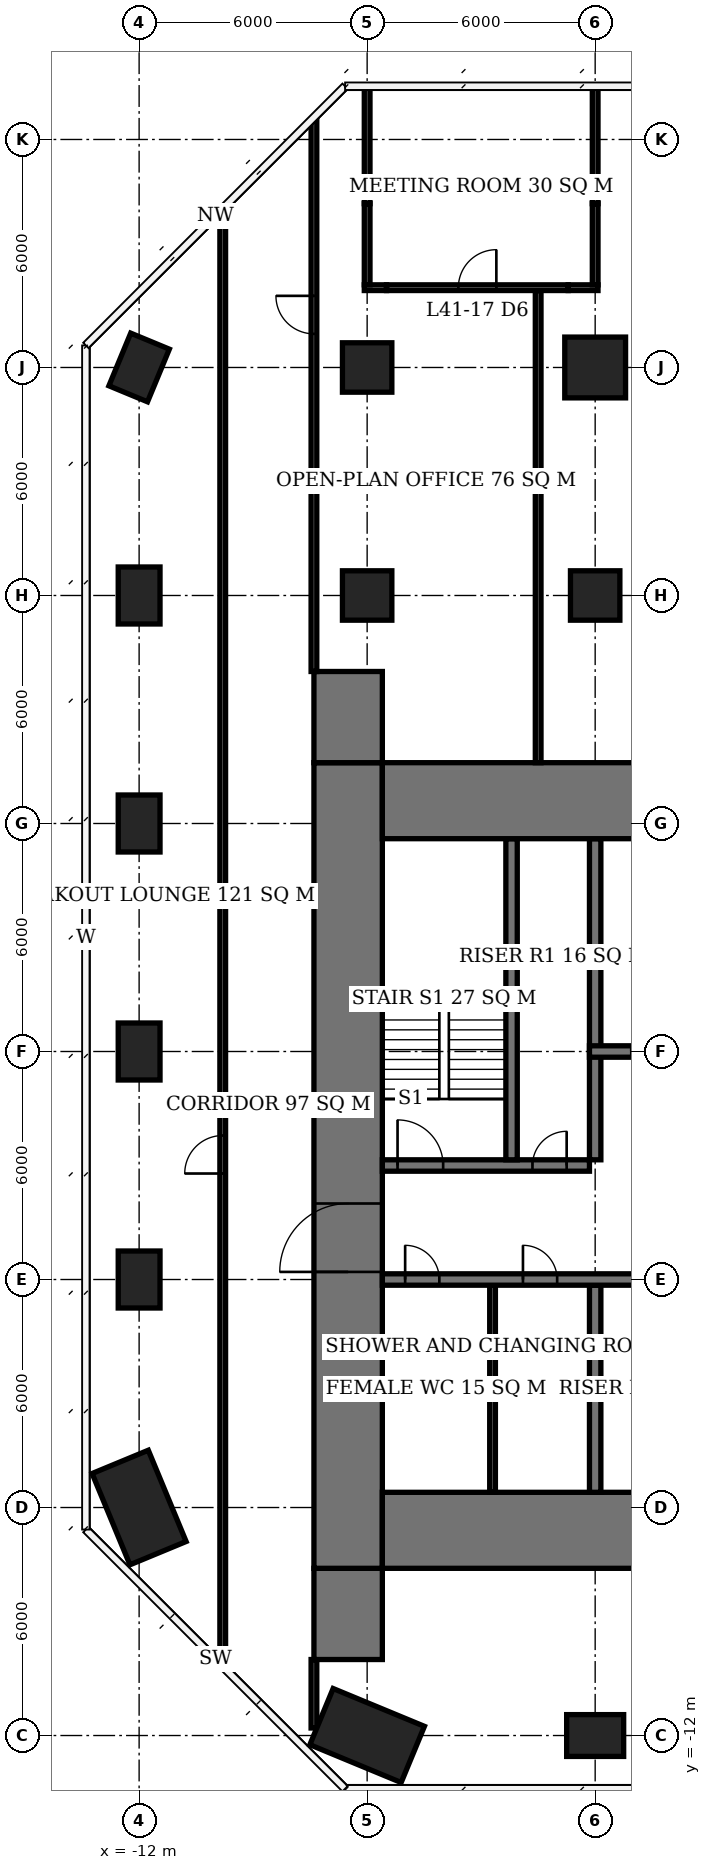
"""IFC4 building model, lengths in metres.
Left out: names, types, materials, properties, quantities, classifications, styles, units other than length and angle.
Written with IfcOpenShell. Run it as: python <this file> out.ifc"""

import sys

from ifc_helpers import new_model, si_unit, direction, frame, frame_2d, origin, origin_2d, place, context, subcontext, project, spatial, rectangle, extrude, element, fill, save


model = new_model("IFC4")
c1 = context("Model", 3, precision=1e-05, world=origin(), true_north=direction((0.0, 1.0)))
c2 = subcontext(c1, "Body", "Model", "MODEL_VIEW")
j1 = project(units=[si_unit("LENGTHUNIT", "METRE"), si_unit("PLANEANGLEUNIT", "RADIAN")], contexts=[c1])
p1 = place(None, origin())
s1 = spatial("IfcSite", under=j1, at=p1, CompositionType="ELEMENT")
p2 = place(p1, origin())
s2 = spatial("IfcBuilding", under=s1, at=p2, CompositionType="ELEMENT")
p3 = place(p2, frame((0.0, 0.0, 169.4)))
s3 = spatial("IfcBuildingStorey", under=s2, at=p3, CompositionType="ELEMENT", Elevation=169.4)
p4 = place(p3, frame((-12.0, -6.0, 0.0), z_axis=(0.0, 0.0, 1.0), x_axis=(-0.382683432365, 0.923879532511, 0.0)))
e1 = element("IfcColumn", 1, at=p4, inside=s3, PredefinedType="COLUMN", context=c2, shape_type="SweptSolid", body=[
    extrude(rectangle(XDim=2.6, YDim=1.6, at=origin_2d()), origin(), (0.0, 0.0, 1.0), 3.9),
])
for number, where, z_axis, x_axis in (
    (2, (-12.0, 0.0, 0.0), (0.0, 0.0, 1.0), (0.0, 1.0, 0.0)),
    (3, (-12.0, 6.0, 0.0), (0.0, 0.0, 1.0), (0.0, 1.0, 0.0)),
    (4, (-12.0, 12.0, 0.0), (0.0, 0.0, 1.0), (0.0, 1.0, 0.0)),
    (5, (-12.0, 18.0, 0.0), (0.0, 0.0, 1.0), (0.0, 1.0, 0.0)),
    (6, (-12.0, 24.0, 0.0), (0.0, 0.0, 1.0), (0.383, 0.924, 0.0)),
):
    element("IfcColumn", number, at=place(p3, frame(where, z_axis=z_axis, x_axis=x_axis)), inside=s3, PredefinedType="COLUMN", context=c2, shape_type="SweptSolid", body=[
        extrude(rectangle(XDim=1.5, YDim=1.1, at=origin_2d()), origin(), (0.0, 0.0, 1.0), 3.9),
    ])
p5 = place(p3, frame((-6.0, -12.0, 0.0), z_axis=(0.0, 0.0, 1.0), x_axis=(-0.923879532511, 0.382683432365, 0.0)))
e7 = element("IfcColumn", 7, at=p5, inside=s3, PredefinedType="COLUMN", context=c2, shape_type="SweptSolid", body=[
    extrude(rectangle(XDim=2.6, YDim=1.6, at=origin_2d()), origin(), (0.0, 0.0, 1.0), 3.9),
])
for number, where, z_axis, x_axis in (
    (8, (-6.0, 18.0, 0.0), (0.0, 0.0, 1.0), (1.0, 0.0, 0.0)),
    (9, (-6.0, 24.0, 0.0), (0.0, 0.0, 1.0), (1.0, 0.0, 0.0)),
):
    element("IfcColumn", number, at=place(p3, frame(where, z_axis=z_axis, x_axis=x_axis)), inside=s3, PredefinedType="COLUMN", context=c2, shape_type="SweptSolid", body=[
        extrude(rectangle(XDim=1.3, YDim=1.3, at=origin_2d()), origin(), (0.0, 0.0, 1.0), 3.9),
    ])
p6 = place(p3, frame((0.0, -12.0, 0.0), z_axis=(0.0, 0.0, 1.0), x_axis=(1.0, 0.0, 0.0)))
e10 = element("IfcColumn", 10, at=p6, inside=s3, PredefinedType="COLUMN", context=c2, shape_type="SweptSolid", body=[
    extrude(rectangle(XDim=1.5, YDim=1.1, at=origin_2d()), origin(), (0.0, 0.0, 1.0), 3.9),
])
p7 = place(p3, frame((0.0, 18.0, 0.0), z_axis=(0.0, 0.0, 1.0), x_axis=(1.0, 0.0, 0.0)))
e11 = element("IfcColumn", 11, at=p7, inside=s3, PredefinedType="COLUMN", context=c2, shape_type="SweptSolid", body=[
    extrude(rectangle(XDim=1.3, YDim=1.3, at=origin_2d()), origin(), (0.0, 0.0, 1.0), 3.9),
])
p8 = place(p3, frame((0.0, 24.0, 0.0), z_axis=(0.0, 0.0, 1.0), x_axis=(1.0, 0.0, 0.0)))
e12 = element("IfcColumn", 12, at=p8, inside=s3, PredefinedType="COLUMN", context=c2, shape_type="SweptSolid", body=[
    extrude(rectangle(XDim=1.6, YDim=1.6, at=origin_2d()), origin(), (0.0, 0.0, 1.0), 3.9),
])
for number, where, z_axis, x_axis in (
    (13, (-5.6, -6.6, 0.0), (0.0, 0.0, 1.0), (1.0, 0.0, 0.0)),
    (14, (-5.6, 12.6, 0.0), (0.0, 0.0, 1.0), (1.0, 0.0, 0.0)),
):
    element("IfcWall", number, at=place(p3, frame(where, z_axis=z_axis, x_axis=x_axis)), inside=s3, PredefinedType="SHEAR", context=c2, shape_type="SweptSolid", body=[
        extrude(rectangle(XDim=23.2, YDim=2.0, at=frame_2d((11.6, 0.0))), origin(), (0.0, 0.0, 1.0), 3.9),
    ])
p9 = place(p3, frame((-6.5, -7.6, 0.0), z_axis=(0.0, 0.0, 1.0), x_axis=(0.0, 1.0, 0.0)))
e15 = element("IfcWall", 15, at=p9, inside=s3, PredefinedType="SHEAR", context=c2, shape_type="SweptSolid", body=[
    extrude(rectangle(XDim=21.2, YDim=1.8, at=frame_2d((10.6, 0.0))), origin(), (0.0, 0.0, 1.0), 3.9),
])
p10 = place(p9, frame((7.8, 0.0, 0.0)))
e16 = element("IfcOpeningElement", 16, at=p10, cuts=e15, PredefinedType="OPENING", context=c2, shape_type="SweptSolid", body=[
    extrude(rectangle(XDim=1.8, YDim=2.4, at=frame_2d((0.9, 1.2))), frame((0.0, 0.91, 0.0), z_axis=(0.0, -1.0, 0.0), x_axis=(1.0, 0.0, 0.0)), (0.0, 0.0, 1.0), 1.82),
])
for number, where, z_axis, x_axis in (
    (17, (-6.5, -10.0, 0.0), (0.0, 0.0, 1.0), (0.0, 1.0, 0.0)),
    (18, (-6.5, 13.6, 0.0), (0.0, 0.0, 1.0), (0.0, 1.0, 0.0)),
):
    element("IfcWall", number, at=place(p3, frame(where, z_axis=z_axis, x_axis=x_axis)), inside=s3, PredefinedType="SHEAR", context=c2, shape_type="SweptSolid", body=[
        extrude(rectangle(XDim=2.4, YDim=1.8, at=frame_2d((1.2, 0.0))), origin(), (0.0, 0.0, 1.0), 3.9),
    ])
p11 = place(p3, frame((-5.6, 0.0, 0.0), z_axis=(0.0, 0.0, 1.0), x_axis=(1.0, 0.0, 0.0)))
e19 = element("IfcWall", 19, at=p11, inside=s3, PredefinedType="SHEAR", context=c2, shape_type="SweptSolid", body=[
    extrude(rectangle(XDim=17.75, YDim=0.3, at=frame_2d((8.875, 0.0))), origin(), (0.0, 0.0, 1.0), 3.9),
])
p12 = place(p11, frame((0.6, 0.0, 0.0)))
e20 = element("IfcOpeningElement", 20, at=p12, cuts=e19, PredefinedType="OPENING", context=c2, shape_type="SweptSolid", body=[
    extrude(rectangle(XDim=0.9, YDim=2.1, at=frame_2d((0.45, 1.05))), frame((0.0, 0.16, 0.0), z_axis=(0.0, -1.0, 0.0), x_axis=(1.0, 0.0, 0.0)), (0.0, 0.0, 1.0), 0.32),
])
p13 = place(p11, frame((3.7, 0.0, 0.0)))
e21 = element("IfcOpeningElement", 21, at=p13, cuts=e19, PredefinedType="OPENING", context=c2, shape_type="SweptSolid", body=[
    extrude(rectangle(XDim=0.9, YDim=2.1, at=frame_2d((0.45, 1.05))), frame((0.0, 0.16, 0.0), z_axis=(0.0, -1.0, 0.0), x_axis=(1.0, 0.0, 0.0)), (0.0, 0.0, 1.0), 0.32),
])
p14 = place(p11, frame((9.6, 0.0, 0.0)))
e22 = element("IfcOpeningElement", 22, at=p14, cuts=e19, PredefinedType="OPENING", context=c2, shape_type="SweptSolid", body=[
    extrude(rectangle(XDim=1.0, YDim=2.1, at=frame_2d((0.5, 1.05))), frame((0.0, 0.16, 0.0), z_axis=(0.0, -1.0, 0.0), x_axis=(1.0, 0.0, 0.0)), (0.0, 0.0, 1.0), 0.32),
])
p15 = place(p11, frame((12.55, 0.0, 0.0)))
e23 = element("IfcOpeningElement", 23, at=p15, cuts=e19, PredefinedType="OPENING", context=c2, shape_type="SweptSolid", body=[
    extrude(rectangle(XDim=1.1, YDim=2.1, at=frame_2d((0.55, 1.05))), frame((0.0, 0.16, 0.0), z_axis=(0.0, -1.0, 0.0), x_axis=(1.0, 0.0, 0.0)), (0.0, 0.0, 1.0), 0.32),
])
p16 = place(p11, frame((15.55, 0.0, 0.0)))
e24 = element("IfcOpeningElement", 24, at=p16, cuts=e19, PredefinedType="OPENING", context=c2, shape_type="SweptSolid", body=[
    extrude(rectangle(XDim=1.1, YDim=2.1, at=frame_2d((0.55, 1.05))), frame((0.0, 0.16, 0.0), z_axis=(0.0, -1.0, 0.0), x_axis=(1.0, 0.0, 0.0)), (0.0, 0.0, 1.0), 0.32),
])
p17 = place(p3, frame((-5.6, 3.0, 0.0), z_axis=(0.0, 0.0, 1.0), x_axis=(1.0, 0.0, 0.0)))
e25 = element("IfcWall", 25, at=p17, inside=s3, PredefinedType="SHEAR", context=c2, shape_type="SweptSolid", body=[
    extrude(rectangle(XDim=5.45, YDim=0.3, at=frame_2d((2.725, 0.0))), origin(), (0.0, 0.0, 1.0), 3.9),
])
p18 = place(p17, frame((0.4, 0.0, 0.0)))
e26 = element("IfcOpeningElement", 26, at=p18, cuts=e25, PredefinedType="OPENING", context=c2, shape_type="SweptSolid", body=[
    extrude(rectangle(XDim=1.2, YDim=2.1, at=frame_2d((0.6, 1.05))), frame((0.0, 0.16, 0.0), z_axis=(0.0, -1.0, 0.0), x_axis=(1.0, 0.0, 0.0)), (0.0, 0.0, 1.0), 0.32),
])
p19 = place(p17, frame((3.95, 0.0, 0.0)))
e27 = element("IfcOpeningElement", 27, at=p19, cuts=e25, PredefinedType="OPENING", context=c2, shape_type="SweptSolid", body=[
    extrude(rectangle(XDim=0.9, YDim=2.1, at=frame_2d((0.45, 1.05))), frame((0.0, 0.16, 0.0), z_axis=(0.0, -1.0, 0.0), x_axis=(1.0, 0.0, 0.0)), (0.0, 0.0, 1.0), 0.32),
])
p20 = place(p3, frame((-0.15, 6.0, 0.0), z_axis=(0.0, 0.0, 1.0), x_axis=(1.0, 0.0, 0.0)))
e28 = element("IfcWall", 28, at=p20, inside=s3, PredefinedType="SHEAR", context=c2, shape_type="SweptSolid", body=[
    extrude(rectangle(XDim=17.75, YDim=0.3, at=frame_2d((8.875, 0.0))), origin(), (0.0, 0.0, 1.0), 3.9),
])
p21 = place(p20, frame((13.15, 0.0, 0.0)))
e29 = element("IfcOpeningElement", 29, at=p21, cuts=e28, PredefinedType="OPENING", context=c2, shape_type="SweptSolid", body=[
    extrude(rectangle(XDim=0.9, YDim=2.1, at=frame_2d((0.45, 1.05))), frame((0.0, 0.16, 0.0), z_axis=(0.0, -1.0, 0.0), x_axis=(1.0, 0.0, 0.0)), (0.0, 0.0, 1.0), 0.32),
])
p22 = place(p20, frame((16.25, 0.0, 0.0)))
e30 = element("IfcOpeningElement", 30, at=p22, cuts=e28, PredefinedType="OPENING", context=c2, shape_type="SweptSolid", body=[
    extrude(rectangle(XDim=1.0, YDim=2.1, at=frame_2d((0.5, 1.05))), frame((0.0, 0.16, 0.0), z_axis=(0.0, -1.0, 0.0), x_axis=(1.0, 0.0, 0.0)), (0.0, 0.0, 1.0), 0.32),
])
p23 = place(p20, frame((7.25, 0.0, 0.0)))
e31 = element("IfcOpeningElement", 31, at=p23, cuts=e28, PredefinedType="OPENING", context=c2, shape_type="SweptSolid", body=[
    extrude(rectangle(XDim=1.0, YDim=2.1, at=frame_2d((0.5, 1.05))), frame((0.0, 0.16, 0.0), z_axis=(0.0, -1.0, 0.0), x_axis=(1.0, 0.0, 0.0)), (0.0, 0.0, 1.0), 0.32),
])
p24 = place(p20, frame((1.1, 0.0, 0.0)))
e32 = element("IfcOpeningElement", 32, at=p24, cuts=e28, PredefinedType="OPENING", context=c2, shape_type="SweptSolid", body=[
    extrude(rectangle(XDim=1.1, YDim=2.1, at=frame_2d((0.55, 1.05))), frame((0.0, 0.16, 0.0), z_axis=(0.0, -1.0, 0.0), x_axis=(1.0, 0.0, 0.0)), (0.0, 0.0, 1.0), 0.32),
])
p25 = place(p20, frame((4.1, 0.0, 0.0)))
e33 = element("IfcOpeningElement", 33, at=p25, cuts=e28, PredefinedType="OPENING", context=c2, shape_type="SweptSolid", body=[
    extrude(rectangle(XDim=1.1, YDim=2.1, at=frame_2d((0.55, 1.05))), frame((0.0, 0.16, 0.0), z_axis=(0.0, -1.0, 0.0), x_axis=(1.0, 0.0, 0.0)), (0.0, 0.0, 1.0), 0.32),
])
p26 = place(p3, frame((0.0, -5.6, 0.0), z_axis=(0.0, 0.0, 1.0), x_axis=(0.0, 1.0, 0.0)))
e34 = element("IfcWall", 34, at=p26, inside=s3, PredefinedType="SHEAR", context=c2, shape_type="SweptSolid", body=[
    extrude(rectangle(XDim=5.45, YDim=0.3, at=frame_2d((2.725, 0.0))), origin(), (0.0, 0.0, 1.0), 3.9),
])
for number, where, z_axis, x_axis in (
    (35, (0.0, 3.15, 0.0), (0.0, 0.0, 1.0), (0.0, 1.0, 0.0)),
    (36, (-2.2, 3.15, 0.0), (0.0, 0.0, 1.0), (0.0, 1.0, 0.0)),
):
    element("IfcWall", number, at=place(p3, frame(where, z_axis=z_axis, x_axis=x_axis)), inside=s3, PredefinedType="SHEAR", context=c2, shape_type="SweptSolid", body=[
        extrude(rectangle(XDim=8.45, YDim=0.3, at=frame_2d((4.225, 0.0))), origin(), (0.0, 0.0, 1.0), 3.9),
    ])
p27 = place(p3, frame((-2.7, -5.6, 0.0), z_axis=(0.0, 0.0, 1.0), x_axis=(0.0, 1.0, 0.0)))
e37 = element("IfcWall", 37, at=p27, inside=s3, PredefinedType="PLUMBINGWALL", context=c2, shape_type="SweptSolid", body=[
    extrude(rectangle(XDim=5.45, YDim=0.15, at=frame_2d((2.725, 0.0))), origin(), (0.0, 0.0, 1.0), 3.65),
])
p28 = place(p3, frame((-6.075, 26.1, 0.0), z_axis=(0.0, 0.0, 1.0), x_axis=(1.0, 0.0, 0.0)))
e38 = element("IfcWall", 38, at=p28, inside=s3, PredefinedType="PARTITIONING", context=c2, shape_type="SweptSolid", body=[
    extrude(rectangle(XDim=0.585, YDim=0.15, at=frame_2d((0.292, 0.0))), origin(), (0.0, 0.0, 1.0), 2.65),
])
p29 = place(p3, frame((-5.49, 26.1, 0.0), z_axis=(0.0, 0.0, 1.0), x_axis=(1.0, 0.0, 0.0)))
e39 = element("IfcWall", 39, at=p29, inside=s3, PredefinedType="PARTITIONING", context=c2, shape_type="SweptSolid", body=[
    extrude(rectangle(XDim=4.78, YDim=0.15, at=frame_2d((2.39, 0.0))), origin(), (0.0, 0.0, 1.0), 3.65),
])
p30 = place(p29, frame((1.89, 0.0, 0.0)))
e40 = element("IfcOpeningElement", 40, at=p30, cuts=e39, PredefinedType="OPENING", context=c2, shape_type="SweptSolid", body=[
    extrude(rectangle(XDim=1.0, YDim=2.1, at=frame_2d((0.5, 1.05))), frame((0.0, 0.085, 0.0), z_axis=(0.0, -1.0, 0.0), x_axis=(1.0, 0.0, 0.0)), (0.0, 0.0, 1.0), 0.17),
])
p31 = place(p3, frame((-0.71, 26.1, 0.0), z_axis=(0.0, 0.0, 1.0), x_axis=(1.0, 0.0, 0.0)))
e41 = element("IfcWall", 41, at=p31, inside=s3, PredefinedType="PARTITIONING", context=c2, shape_type="SweptSolid", body=[
    extrude(rectangle(XDim=0.785, YDim=0.15, at=frame_2d((0.393, 0.0))), origin(), (0.0, 0.0, 1.0), 2.65),
])
p32 = place(p3, frame((-6.0, 26.175, 0.0), z_axis=(0.0, 0.0, 1.0), x_axis=(0.0, 1.0, 0.0)))
e42 = element("IfcWall", 42, at=p32, inside=s3, PredefinedType="PARTITIONING", context=c2, shape_type="SweptSolid", body=[
    extrude(rectangle(XDim=2.135, YDim=0.15, at=frame_2d((1.067, 0.0))), origin(), (0.0, 0.0, 1.0), 2.65),
])
p33 = place(p3, frame((-6.0, 28.31, 0.0), z_axis=(0.0, 0.0, 1.0), x_axis=(0.0, 1.0, 0.0)))
e43 = element("IfcWall", 43, at=p33, inside=s3, PredefinedType="PARTITIONING", context=c2, shape_type="SweptSolid", body=[
    extrude(rectangle(XDim=3.065, YDim=0.15, at=frame_2d((1.532, 0.0))), origin(), (0.0, 0.0, 1.0), 3.65),
])
p34 = place(p3, frame((0.0, 26.175, 0.0), z_axis=(0.0, 0.0, 1.0), x_axis=(0.0, 1.0, 0.0)))
e44 = element("IfcWall", 44, at=p34, inside=s3, PredefinedType="PARTITIONING", context=c2, shape_type="SweptSolid", body=[
    extrude(rectangle(XDim=2.135, YDim=0.15, at=frame_2d((1.067, 0.0))), origin(), (0.0, 0.0, 1.0), 2.65),
])
p35 = place(p3, frame((0.0, 28.31, 0.0), z_axis=(0.0, 0.0, 1.0), x_axis=(0.0, 1.0, 0.0)))
e45 = element("IfcWall", 45, at=p35, inside=s3, PredefinedType="PARTITIONING", context=c2, shape_type="SweptSolid", body=[
    extrude(rectangle(XDim=3.065, YDim=0.15, at=frame_2d((1.532, 0.0))), origin(), (0.0, 0.0, 1.0), 3.65),
])
p36 = place(p3, frame((-9.8, -10.088, 0.0), z_axis=(0.0, 0.0, 1.0), x_axis=(0.0, 1.0, 0.0)))
e46 = element("IfcWall", 46, at=p36, inside=s3, PredefinedType="PARTITIONING", context=c2, shape_type="SweptSolid", body=[
    extrude(rectangle(XDim=38.176, YDim=0.15, at=frame_2d((19.088, 0.0))), origin(), (0.0, 0.0, 1.0), 3.65),
])
p37 = place(p36, frame((12.877, 0.0, 0.0)))
e47 = element("IfcOpeningElement", 47, at=p37, cuts=e46, PredefinedType="OPENING", context=c2, shape_type="SweptSolid", body=[
    extrude(rectangle(XDim=1.0, YDim=2.1, at=frame_2d((0.5, 1.05))), frame((0.0, 0.085, 0.0), z_axis=(0.0, -1.0, 0.0), x_axis=(1.0, 0.0, 0.0)), (0.0, 0.0, 1.0), 0.17),
])
p38 = place(p3, frame((-7.4, -11.802, 0.0), z_axis=(0.0, 0.0, 1.0), x_axis=(0.0, 1.0, 0.0)))
e48 = element("IfcWall", 48, at=p38, inside=s3, PredefinedType="PARTITIONING", context=c2, shape_type="SweptSolid", body=[
    extrude(rectangle(XDim=1.802, YDim=0.15, at=frame_2d((0.901, 0.0))), origin(), (0.0, 0.0, 1.0), 3.65),
])
p39 = place(p3, frame((-7.4, 16.0, 0.0), z_axis=(0.0, 0.0, 1.0), x_axis=(0.0, 1.0, 0.0)))
e49 = element("IfcWall", 49, at=p39, inside=s3, PredefinedType="PARTITIONING", context=c2, shape_type="SweptSolid", body=[
    extrude(rectangle(XDim=14.489, YDim=0.15, at=frame_2d((7.245, 0.0))), origin(), (0.0, 0.0, 1.0), 3.65),
])
p40 = place(p39, frame((8.885, 0.0, 0.0)))
e50 = element("IfcOpeningElement", 50, at=p40, cuts=e49, PredefinedType="OPENING", context=c2, shape_type="SweptSolid", body=[
    extrude(rectangle(XDim=1.0, YDim=2.1, at=frame_2d((0.5, 1.05))), frame((0.0, 0.085, 0.0), z_axis=(0.0, -1.0, 0.0), x_axis=(1.0, 0.0, 0.0)), (0.0, 0.0, 1.0), 0.17),
])
p41 = place(p3, frame((-1.5, 13.6, 0.0), z_axis=(0.0, 0.0, 1.0), x_axis=(0.0, 1.0, 0.0)))
e51 = element("IfcWall", 51, at=p41, inside=s3, PredefinedType="PARTITIONING", context=c2, shape_type="SweptSolid", body=[
    extrude(rectangle(XDim=12.425, YDim=0.15, at=frame_2d((6.212, 0.0))), origin(), (0.0, 0.0, 1.0), 3.65),
])
p42 = place(p10, origin())
e52 = element("IfcDoor", 52, at=p42, inside=s3, OperationType="DOUBLE_DOOR_SINGLE_SWING", PredefinedType="DOOR", context=c2, shape_type="SweptSolid", body=[
    extrude(rectangle(XDim=1.8, YDim=2.4, at=frame_2d((0.9, 1.2))), frame((0.0, 0.025, 0.0), z_axis=(0.0, -1.0, 0.0), x_axis=(1.0, 0.0, 0.0)), (0.0, 0.0, 1.0), 0.05),
])
fill(e16, e52)
p43 = place(p18, origin())
e53 = element("IfcDoor", 53, at=p43, inside=s3, OperationType="SINGLE_SWING_LEFT", PredefinedType="DOOR", context=c2, shape_type="SweptSolid", body=[
    extrude(rectangle(XDim=1.2, YDim=2.1, at=frame_2d((0.6, 1.05))), frame((0.0, 0.025, 0.0), z_axis=(0.0, -1.0, 0.0), x_axis=(1.0, 0.0, 0.0)), (0.0, 0.0, 1.0), 0.05),
])
fill(e26, e53)
p44 = place(p19, origin())
e54 = element("IfcDoor", 54, at=p44, inside=s3, OperationType="SINGLE_SWING_RIGHT", PredefinedType="DOOR", context=c2, shape_type="SweptSolid", body=[
    extrude(rectangle(XDim=0.9, YDim=2.1, at=frame_2d((0.45, 1.05))), frame((0.0, 0.025, 0.0), z_axis=(0.0, -1.0, 0.0), x_axis=(1.0, 0.0, 0.0)), (0.0, 0.0, 1.0), 0.05),
])
fill(e27, e54)
p45 = place(p12, origin())
e55 = element("IfcDoor", 55, at=p45, inside=s3, OperationType="SINGLE_SWING_LEFT", PredefinedType="DOOR", context=c2, shape_type="SweptSolid", body=[
    extrude(rectangle(XDim=0.9, YDim=2.1, at=frame_2d((0.45, 1.05))), frame((0.0, 0.025, 0.0), z_axis=(0.0, -1.0, 0.0), x_axis=(1.0, 0.0, 0.0)), (0.0, 0.0, 1.0), 0.05),
])
fill(e20, e55)
p46 = place(p13, origin())
e56 = element("IfcDoor", 56, at=p46, inside=s3, OperationType="SINGLE_SWING_LEFT", PredefinedType="DOOR", context=c2, shape_type="SweptSolid", body=[
    extrude(rectangle(XDim=0.9, YDim=2.1, at=frame_2d((0.45, 1.05))), frame((0.0, 0.025, 0.0), z_axis=(0.0, -1.0, 0.0), x_axis=(1.0, 0.0, 0.0)), (0.0, 0.0, 1.0), 0.05),
])
fill(e21, e56)
p47 = place(p30, origin())
e57 = element("IfcDoor", 57, at=p47, inside=s3, OperationType="SINGLE_SWING_RIGHT", PredefinedType="DOOR", context=c2, shape_type="SweptSolid", body=[
    extrude(rectangle(XDim=1.0, YDim=2.1, at=frame_2d((0.5, 1.05))), frame((0.0, 0.025, 0.0), z_axis=(0.0, -1.0, 0.0), x_axis=(1.0, 0.0, 0.0)), (0.0, 0.0, 1.0), 0.05),
])
fill(e40, e57)
p48 = place(p37, origin())
e58 = element("IfcDoor", 58, at=p48, inside=s3, OperationType="SINGLE_SWING_LEFT", PredefinedType="DOOR", context=c2, shape_type="SweptSolid", body=[
    extrude(rectangle(XDim=1.0, YDim=2.1, at=frame_2d((0.5, 1.05))), frame((0.0, 0.025, 0.0), z_axis=(0.0, -1.0, 0.0), x_axis=(1.0, 0.0, 0.0)), (0.0, 0.0, 1.0), 0.05),
])
fill(e47, e58)
p49 = place(p40, origin())
e59 = element("IfcDoor", 59, at=p49, inside=s3, OperationType="SINGLE_SWING_RIGHT", PredefinedType="DOOR", context=c2, shape_type="SweptSolid", body=[
    extrude(rectangle(XDim=1.0, YDim=2.1, at=frame_2d((0.5, 1.05))), frame((0.0, 0.025, 0.0), z_axis=(0.0, -1.0, 0.0), x_axis=(1.0, 0.0, 0.0)), (0.0, 0.0, 1.0), 0.05),
])
fill(e50, e59)
save(model, sys.argv[1])
